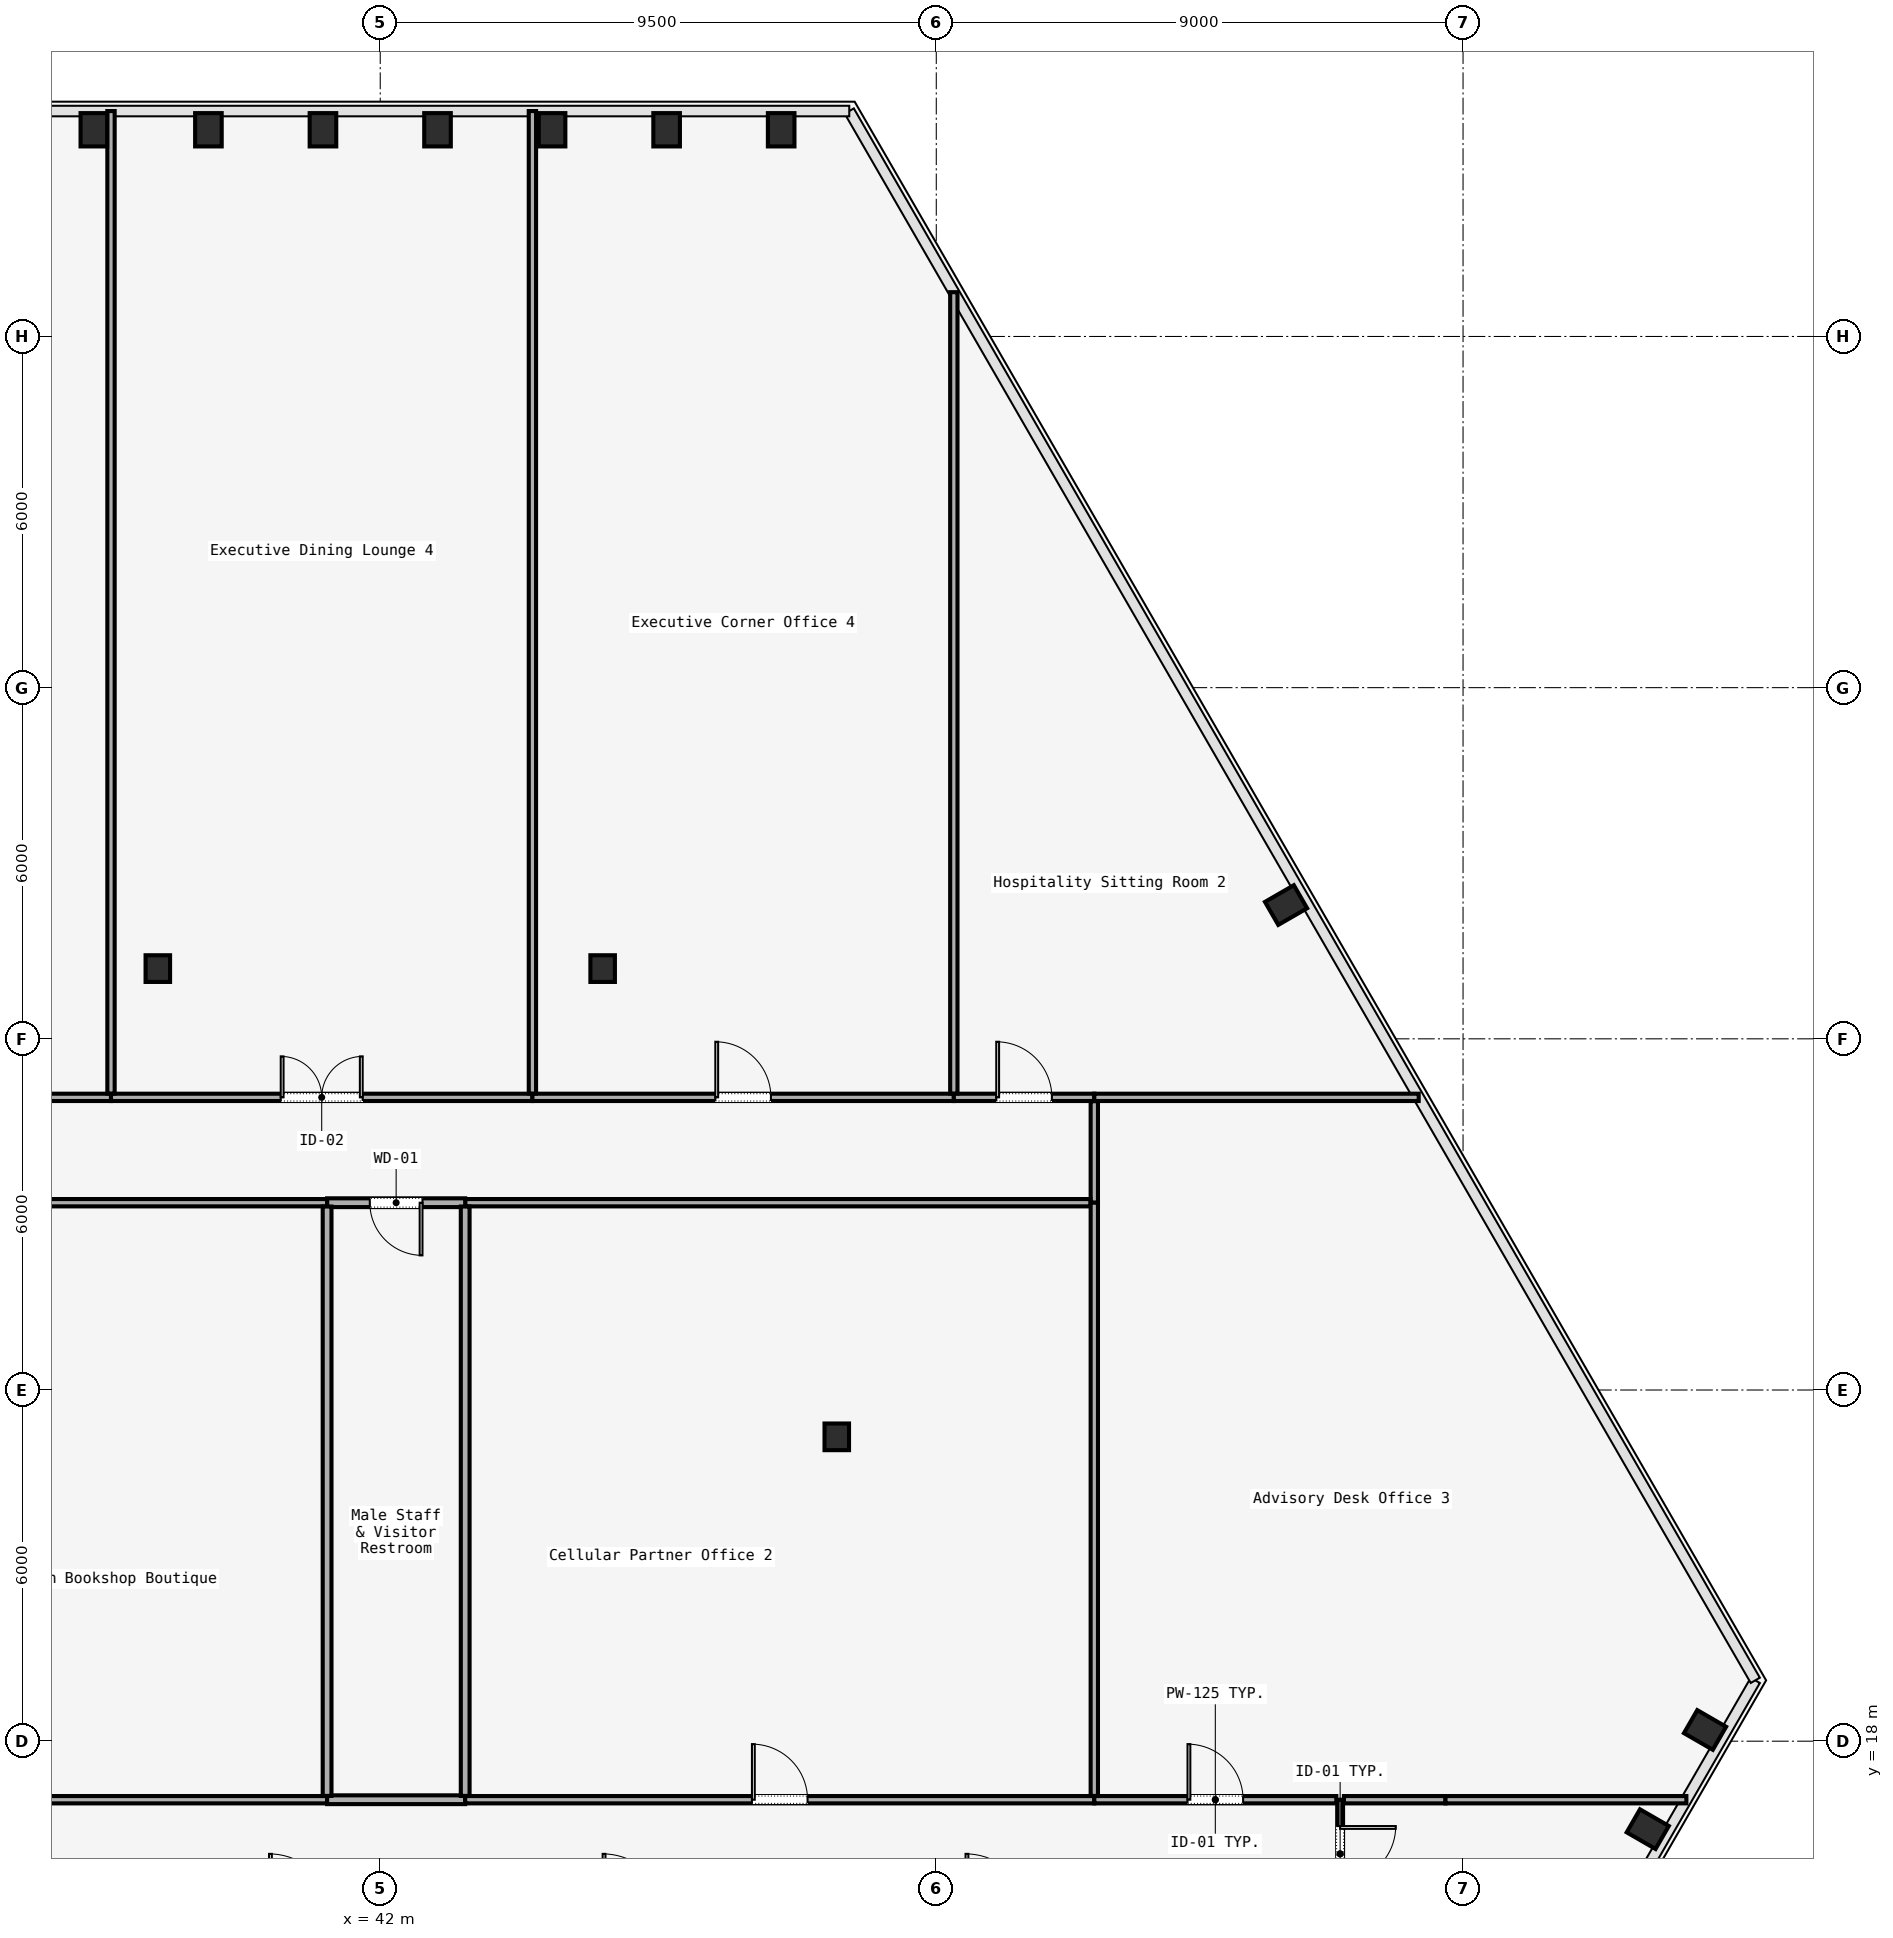
"""IFC4 building model, lengths in metres.
Left out: names, types, materials, properties, quantities, classifications, styles, units other than length and angle.
Written with IfcOpenShell. Run it as: python <this file> out.ifc"""

import sys

from ifc_helpers import new_model, si_unit, direction, frame, frame_2d, origin, origin_2d, place, context, subcontext, project, spatial, rectangle, i_section, extrude, element, fill, save


model = new_model("IFC4")
c1 = context("Model", 3, precision=1e-05, world=origin(), true_north=direction((0.0, 1.0)))
c2 = subcontext(c1, "Body", "Model", "MODEL_VIEW")
j1 = project(units=[si_unit("LENGTHUNIT", "METRE"), si_unit("PLANEANGLEUNIT", "RADIAN")], contexts=[c1])
p1 = place(None, origin())
s1 = spatial("IfcSite", under=j1, at=p1, CompositionType="ELEMENT")
p2 = place(p1, origin())
s2 = spatial("IfcBuilding", under=s1, at=p2, CompositionType="ELEMENT")
p3 = place(p2, frame((0.0, 0.0, 51.2)))
s3 = spatial("IfcBuildingStorey", under=s2, at=p3, CompositionType="ELEMENT", Elevation=51.2)
for number, where, z_axis, x_axis in (
    (1, (49.8, 23.2, 0.0), (0.0, 0.0, 1.0), (1.0, 0.0, 0.0)),
    (2, (38.2, 31.2, 0.0), (0.0, 0.0, 1.0), (1.0, 0.0, 0.0)),
    (3, (45.8, 31.2, 0.0), (0.0, 0.0, 1.0), (1.0, 0.0, 0.0)),
):
    element("IfcColumn", number, at=place(p3, frame(where, z_axis=z_axis, x_axis=x_axis)), inside=s3, PredefinedType="COLUMN", context=c2, shape_type="SweptSolid", body=[
        extrude(i_section(OverallWidth=0.418, OverallDepth=0.456, WebThickness=0.042, FlangeThickness=0.067, FilletRadius=0.015, at=origin_2d()), origin(), (0.0, 0.0, 1.0), 3.58),
    ])
for number, where, z_axis, x_axis in (
    (4, (63.656, 16.497, 0.0), (0.0, 0.0, 1.0), (0.5, 0.866, 0.0)),
    (5, (64.635, 18.192, 0.0), (0.0, 0.0, 1.0), (0.5, 0.866, 0.0)),
    (6, (57.476, 32.285, 0.0), (0.0, 0.0, 1.0), (-0.5, 0.866, 0.0)),
    (7, (48.85, 45.531, 0.0), (0.0, 0.0, 1.0), (1.0, 0.0, 0.0)),
    (8, (46.893, 45.531, 0.0), (0.0, 0.0, 1.0), (1.0, 0.0, 0.0)),
    (9, (44.936, 45.531, 0.0), (0.0, 0.0, 1.0), (1.0, 0.0, 0.0)),
    (10, (42.979, 45.531, 0.0), (0.0, 0.0, 1.0), (1.0, 0.0, 0.0)),
    (11, (41.021, 45.531, 0.0), (0.0, 0.0, 1.0), (1.0, 0.0, 0.0)),
    (12, (39.064, 45.531, 0.0), (0.0, 0.0, 1.0), (1.0, 0.0, 0.0)),
    (13, (37.107, 45.531, 0.0), (0.0, 0.0, 1.0), (1.0, 0.0, 0.0)),
):
    element("IfcColumn", number, at=place(p3, frame(where, z_axis=z_axis, x_axis=x_axis)), inside=s3, PredefinedType="COLUMN", context=c2, shape_type="SweptSolid", body=[
        extrude(i_section(OverallWidth=0.454, OverallDepth=0.569, WebThickness=0.078, FlangeThickness=0.08, FilletRadius=0.015, at=origin_2d()), origin(), (0.0, 0.0, 1.0), 3.58),
    ])
p4 = place(p3, frame((58.4, 17.0, 0.0), z_axis=(0.0, 0.0, 1.0), x_axis=(0.0, -1.0, 0.0)))
e14 = element("IfcWall", 14, at=p4, inside=s3, PredefinedType="MOVABLE", context=c2, shape_type="SweptSolid", body=[
    extrude(rectangle(XDim=1.85, YDim=0.1, at=frame_2d((0.925, 0.0))), origin(), (0.0, 0.0, 1.0), 2.933),
])
p5 = place(p4, frame((0.45, 0.0, 0.0)))
e15 = element("IfcOpeningElement", 15, at=p5, cuts=e14, PredefinedType="OPENING", context=c2, shape_type="SweptSolid", body=[
    extrude(rectangle(XDim=0.95, YDim=2.2, at=frame_2d((0.475, 1.1))), frame((0.0, 0.05, 0.0), z_axis=(0.0, -1.0, 0.0), x_axis=(1.0, 0.0, 0.0)), (0.0, 0.0, 1.0), 0.1),
])
p6 = place(p3, frame((31.6, 29.0, 0.0), z_axis=(0.0, 0.0, 1.0), x_axis=(1.0, 0.0, 0.0)))
e16 = element("IfcWall", 16, at=p6, inside=s3, PredefinedType="PARTITIONING", context=c2, shape_type="SweptSolid", body=[
    extrude(rectangle(XDim=5.8, YDim=0.125, at=frame_2d((2.9, 0.0))), origin(), (0.0, 0.0, 1.0), 2.933),
])
p7 = place(p6, frame((2.425, 0.0, 0.0)))
e17 = element("IfcOpeningElement", 17, at=p7, cuts=e16, PredefinedType="OPENING", context=c2, shape_type="SweptSolid", body=[
    extrude(rectangle(XDim=0.95, YDim=2.2, at=frame_2d((0.475, 1.1))), frame((0.0, 0.062, 0.0), z_axis=(0.0, -1.0, 0.0), x_axis=(1.0, 0.0, 0.0)), (0.0, 0.0, 1.0), 0.125),
])
p8 = place(p3, frame((37.4, 29.0, 0.0), z_axis=(0.0, 0.0, 1.0), x_axis=(1.0, 0.0, 0.0)))
e18 = element("IfcWall", 18, at=p8, inside=s3, PredefinedType="PARTITIONING", context=c2, shape_type="SweptSolid", body=[
    extrude(rectangle(XDim=7.2, YDim=0.125, at=frame_2d((3.6, 0.0))), origin(), (0.0, 0.0, 1.0), 2.933),
])
p9 = place(p8, frame((2.9, 0.0, 0.0)))
e19 = element("IfcOpeningElement", 19, at=p9, cuts=e18, PredefinedType="OPENING", context=c2, shape_type="SweptSolid", body=[
    extrude(rectangle(XDim=1.4, YDim=2.2, at=frame_2d((0.7, 1.1))), frame((0.0, 0.062, 0.0), z_axis=(0.0, -1.0, 0.0), x_axis=(1.0, 0.0, 0.0)), (0.0, 0.0, 1.0), 0.125),
])
p10 = place(p3, frame((44.6, 29.0, 0.0), z_axis=(0.0, 0.0, 1.0), x_axis=(1.0, 0.0, 0.0)))
e20 = element("IfcWall", 20, at=p10, inside=s3, PredefinedType="PARTITIONING", context=c2, shape_type="SweptSolid", body=[
    extrude(rectangle(XDim=7.2, YDim=0.125, at=frame_2d((3.6, 0.0))), origin(), (0.0, 0.0, 1.0), 2.933),
])
p11 = place(p10, frame((3.125, 0.0, 0.0)))
e21 = element("IfcOpeningElement", 21, at=p11, cuts=e20, PredefinedType="OPENING", context=c2, shape_type="SweptSolid", body=[
    extrude(rectangle(XDim=0.95, YDim=2.2, at=frame_2d((0.475, 1.1))), frame((0.0, 0.062, 0.0), z_axis=(0.0, -1.0, 0.0), x_axis=(1.0, 0.0, 0.0)), (0.0, 0.0, 1.0), 0.125),
])
p12 = place(p3, frame((51.8, 29.0, 0.0), z_axis=(0.0, 0.0, 1.0), x_axis=(1.0, 0.0, 0.0)))
e22 = element("IfcWall", 22, at=p12, inside=s3, PredefinedType="PARTITIONING", context=c2, shape_type="SweptSolid", body=[
    extrude(rectangle(XDim=2.4, YDim=0.125, at=frame_2d((1.2, 0.0))), origin(), (0.0, 0.0, 1.0), 2.933),
])
p13 = place(p12, frame((0.725, 0.0, 0.0)))
e23 = element("IfcOpeningElement", 23, at=p13, cuts=e22, PredefinedType="OPENING", context=c2, shape_type="SweptSolid", body=[
    extrude(rectangle(XDim=0.95, YDim=2.2, at=frame_2d((0.475, 1.1))), frame((0.0, 0.062, 0.0), z_axis=(0.0, -1.0, 0.0), x_axis=(1.0, 0.0, 0.0)), (0.0, 0.0, 1.0), 0.125),
])
p14 = place(p3, frame((54.2, 28.935, 0.0), z_axis=(0.0, 0.0, 1.0), x_axis=(0.0, -1.0, 0.0)))
e24 = element("IfcWall", 24, at=p14, inside=s3, PredefinedType="PARTITIONING", context=c2, shape_type="SweptSolid", body=[
    extrude(rectangle(XDim=1.735, YDim=0.125, at=frame_2d((0.868, 0.0))), origin(), (0.0, 0.0, 1.0), 2.933),
])
p15 = place(p3, frame((54.135, 27.2, 0.0), z_axis=(0.0, 0.0, 1.0), x_axis=(-1.0, 0.0, 0.0)))
e25 = element("IfcWall", 25, at=p15, inside=s3, PredefinedType="PARTITIONING", context=c2, shape_type="SweptSolid", body=[
    extrude(rectangle(XDim=10.684, YDim=0.125, at=frame_2d((5.342, 0.0))), origin(), (0.0, 0.0, 1.0), 2.933),
])
p16 = place(p3, frame((43.451, 27.2, 0.0), z_axis=(0.0, 0.0, 1.0), x_axis=(-1.0, 0.0, 0.0)))
e26 = element("IfcWall", 26, at=p16, inside=s3, PredefinedType="PARTITIONING", context=c2, shape_type="SweptSolid", body=[
    extrude(rectangle(XDim=2.359, YDim=0.15, at=frame_2d((1.18, 0.0))), origin(), (0.0, 0.0, 1.0), 2.933),
])
p17 = place(p16, frame((0.73, 0.0, 0.0)))
e27 = element("IfcOpeningElement", 27, at=p17, cuts=e26, PredefinedType="OPENING", context=c2, shape_type="SweptSolid", body=[
    extrude(rectangle(XDim=0.9, YDim=2.15, at=frame_2d((0.45, 1.075))), frame((0.0, 0.075, 0.0), z_axis=(0.0, -1.0, 0.0), x_axis=(1.0, 0.0, 0.0)), (0.0, 0.0, 1.0), 0.15),
])
p18 = place(p3, frame((41.092, 27.2, 0.0), z_axis=(0.0, 0.0, 1.0), x_axis=(-1.0, 0.0, 0.0)))
e28 = element("IfcWall", 28, at=p18, inside=s3, PredefinedType="PARTITIONING", context=c2, shape_type="SweptSolid", body=[
    extrude(rectangle(XDim=9.492, YDim=0.125, at=frame_2d((4.746, 0.0))), origin(), (0.0, 0.0, 1.0), 2.933),
])
p19 = place(p3, frame((31.665, 17.0, 0.0), z_axis=(0.0, 0.0, 1.0), x_axis=(1.0, 0.0, 0.0)))
e29 = element("IfcWall", 29, at=p19, inside=s3, PredefinedType="PARTITIONING", context=c2, shape_type="SweptSolid", body=[
    extrude(rectangle(XDim=9.427, YDim=0.125, at=frame_2d((4.713, 0.0))), origin(), (0.0, 0.0, 1.0), 2.933),
])
p20 = place(p3, frame((41.092, 17.0, 0.0), z_axis=(0.0, 0.0, 1.0), x_axis=(1.0, 0.0, 0.0)))
e30 = element("IfcWall", 30, at=p20, inside=s3, PredefinedType="PARTITIONING", context=c2, shape_type="SweptSolid", body=[
    extrude(rectangle(XDim=2.359, YDim=0.15, at=frame_2d((1.18, 0.0))), origin(), (0.0, 0.0, 1.0), 2.933),
])
p21 = place(p3, frame((43.451, 17.0, 0.0), z_axis=(0.0, 0.0, 1.0), x_axis=(1.0, 0.0, 0.0)))
e31 = element("IfcWall", 31, at=p21, inside=s3, PredefinedType="PARTITIONING", context=c2, shape_type="SweptSolid", body=[
    extrude(rectangle(XDim=10.749, YDim=0.125, at=frame_2d((5.374, 0.0))), origin(), (0.0, 0.0, 1.0), 2.933),
])
p22 = place(p21, frame((4.899, 0.0, 0.0)))
e32 = element("IfcOpeningElement", 32, at=p22, cuts=e31, PredefinedType="OPENING", context=c2, shape_type="SweptSolid", body=[
    extrude(rectangle(XDim=0.95, YDim=2.2, at=frame_2d((0.475, 1.1))), frame((0.0, 0.062, 0.0), z_axis=(0.0, -1.0, 0.0), x_axis=(1.0, 0.0, 0.0)), (0.0, 0.0, 1.0), 0.125),
])
p23 = place(p3, frame((54.2, 17.0, 0.0), z_axis=(0.0, 0.0, 1.0), x_axis=(1.0, 0.0, 0.0)))
e33 = element("IfcWall", 33, at=p23, inside=s3, PredefinedType="PARTITIONING", context=c2, shape_type="SweptSolid", body=[
    extrude(rectangle(XDim=4.135, YDim=0.125, at=frame_2d((2.067, 0.0))), origin(), (0.0, 0.0, 1.0), 2.933),
])
p24 = place(p23, frame((1.593, 0.0, 0.0)))
e34 = element("IfcOpeningElement", 34, at=p24, cuts=e33, PredefinedType="OPENING", context=c2, shape_type="SweptSolid", body=[
    extrude(rectangle(XDim=0.95, YDim=2.2, at=frame_2d((0.475, 1.1))), frame((0.0, 0.062, 0.0), z_axis=(0.0, -1.0, 0.0), x_axis=(1.0, 0.0, 0.0)), (0.0, 0.0, 1.0), 0.125),
])
p25 = place(p3, frame((58.465, 17.0, 0.0), z_axis=(0.0, 0.0, 1.0), x_axis=(1.0, 0.0, 0.0)))
e35 = element("IfcWall", 35, at=p25, inside=s3, PredefinedType="PARTITIONING", context=c2, shape_type="SweptSolid", body=[
    extrude(rectangle(XDim=1.735, YDim=0.125, at=frame_2d((0.867, 0.0))), origin(), (0.0, 0.0, 1.0), 2.933),
])
p26 = place(p3, frame((60.2, 17.0, 0.0), z_axis=(0.0, 0.0, 1.0), x_axis=(1.0, 0.0, 0.0)))
e36 = element("IfcWall", 36, at=p26, inside=s3, PredefinedType="PARTITIONING", context=c2, shape_type="SweptSolid", body=[
    extrude(rectangle(XDim=4.116, YDim=0.125, at=frame_2d((2.058, 0.0))), origin(), (0.0, 0.0, 1.0), 2.933),
])
for number, where, z_axis, x_axis in (
    (37, (41.092, 27.135, 0.0), (0.0, 0.0, 1.0), (0.0, -1.0, 0.0)),
    (38, (43.451, 27.135, 0.0), (0.0, 0.0, 1.0), (0.0, -1.0, 0.0)),
):
    element("IfcWall", number, at=place(p3, frame(where, z_axis=z_axis, x_axis=x_axis)), inside=s3, PredefinedType="PARTITIONING", context=c2, shape_type="SweptSolid", body=[
        extrude(rectangle(XDim=10.07, YDim=0.15, at=frame_2d((5.035, 0.0))), origin(), (0.0, 0.0, 1.0), 2.933),
    ])
p27 = place(p3, frame((54.2, 27.2, 0.0), z_axis=(0.0, 0.0, 1.0), x_axis=(0.0, -1.0, 0.0)))
e39 = element("IfcWall", 39, at=p27, inside=s3, PredefinedType="PARTITIONING", context=c2, shape_type="SweptSolid", body=[
    extrude(rectangle(XDim=10.135, YDim=0.125, at=frame_2d((5.067, 0.0))), origin(), (0.0, 0.0, 1.0), 2.933),
])
p28 = place(p3, frame((54.2, 29.0, 0.0), z_axis=(0.0, 0.0, 1.0), x_axis=(1.0, 0.0, 0.0)))
e40 = element("IfcWall", 40, at=p28, inside=s3, PredefinedType="PARTITIONING", context=c2, shape_type="SweptSolid", body=[
    extrude(rectangle(XDim=5.542, YDim=0.125, at=frame_2d((2.771, 0.0))), origin(), (0.0, 0.0, 1.0), 2.933),
])
p29 = place(p3, frame((51.8, 29.065, 0.0), z_axis=(0.0, 0.0, 1.0), x_axis=(0.0, 1.0, 0.0)))
e41 = element("IfcWall", 41, at=p29, inside=s3, PredefinedType="PARTITIONING", context=c2, shape_type="SweptSolid", body=[
    extrude(rectangle(XDim=13.692, YDim=0.125, at=frame_2d((6.846, 0.0))), origin(), (0.0, 0.0, 1.0), 2.933),
])
for number, where, z_axis, x_axis in (
    (42, (37.4, 45.851, 0.0), (0.0, 0.0, 1.0), (0.0, -1.0, 0.0)),
    (43, (44.6, 29.065, 0.0), (0.0, 0.0, 1.0), (0.0, 1.0, 0.0)),
):
    element("IfcWall", number, at=place(p3, frame(where, z_axis=z_axis, x_axis=x_axis)), inside=s3, PredefinedType="PARTITIONING", context=c2, shape_type="SweptSolid", body=[
        extrude(rectangle(XDim=16.786, YDim=0.125, at=frame_2d((8.393, 0.0))), origin(), (0.0, 0.0, 1.0), 2.933),
    ])
p30 = place(p5, origin())
e44 = element("IfcDoor", 44, at=p30, inside=s3, OperationType="SINGLE_SWING_RIGHT", PredefinedType="DOOR", context=c2, shape_type="SweptSolid", body=[
    extrude(rectangle(XDim=0.95, YDim=2.2, at=frame_2d((0.475, 1.1))), frame((0.0, 0.025, 0.0), z_axis=(0.0, -1.0, 0.0), x_axis=(1.0, 0.0, 0.0)), (0.0, 0.0, 1.0), 0.05),
])
fill(e15, e44)
p31 = place(p17, origin())
e45 = element("IfcDoor", 45, at=p31, inside=s3, OperationType="SINGLE_SWING_LEFT", PredefinedType="DOOR", context=c2, shape_type="SweptSolid", body=[
    extrude(rectangle(XDim=0.9, YDim=2.15, at=frame_2d((0.45, 1.075))), frame((0.0, 0.025, 0.0), z_axis=(0.0, -1.0, 0.0), x_axis=(1.0, 0.0, 0.0)), (0.0, 0.0, 1.0), 0.05),
])
fill(e27, e45)
p32 = place(p22, origin())
e46 = element("IfcDoor", 46, at=p32, inside=s3, OperationType="SINGLE_SWING_RIGHT", PredefinedType="DOOR", context=c2, shape_type="SweptSolid", body=[
    extrude(rectangle(XDim=0.95, YDim=2.2, at=frame_2d((0.475, 1.1))), frame((0.0, 0.025, 0.0), z_axis=(0.0, -1.0, 0.0), x_axis=(1.0, 0.0, 0.0)), (0.0, 0.0, 1.0), 0.05),
])
fill(e32, e46)
p33 = place(p24, origin())
e47 = element("IfcDoor", 47, at=p33, inside=s3, OperationType="SINGLE_SWING_LEFT", PredefinedType="DOOR", context=c2, shape_type="SweptSolid", body=[
    extrude(rectangle(XDim=0.95, YDim=2.2, at=frame_2d((0.475, 1.1))), frame((0.0, 0.025, 0.0), z_axis=(0.0, -1.0, 0.0), x_axis=(1.0, 0.0, 0.0)), (0.0, 0.0, 1.0), 0.05),
])
fill(e34, e47)
p34 = place(p13, origin())
e48 = element("IfcDoor", 48, at=p34, inside=s3, OperationType="SINGLE_SWING_LEFT", PredefinedType="DOOR", context=c2, shape_type="SweptSolid", body=[
    extrude(rectangle(XDim=0.95, YDim=2.2, at=frame_2d((0.475, 1.1))), frame((0.0, 0.025, 0.0), z_axis=(0.0, -1.0, 0.0), x_axis=(1.0, 0.0, 0.0)), (0.0, 0.0, 1.0), 0.05),
])
fill(e23, e48)
p35 = place(p11, origin())
e49 = element("IfcDoor", 49, at=p35, inside=s3, OperationType="SINGLE_SWING_LEFT", PredefinedType="DOOR", context=c2, shape_type="SweptSolid", body=[
    extrude(rectangle(XDim=0.95, YDim=2.2, at=frame_2d((0.475, 1.1))), frame((0.0, 0.025, 0.0), z_axis=(0.0, -1.0, 0.0), x_axis=(1.0, 0.0, 0.0)), (0.0, 0.0, 1.0), 0.05),
])
fill(e21, e49)
p36 = place(p9, origin())
e50 = element("IfcDoor", 50, at=p36, inside=s3, OperationType="SINGLE_SWING_RIGHT", PredefinedType="DOOR", context=c2, shape_type="SweptSolid", body=[
    extrude(rectangle(XDim=1.4, YDim=2.2, at=frame_2d((0.7, 1.1))), frame((0.0, 0.025, 0.0), z_axis=(0.0, -1.0, 0.0), x_axis=(1.0, 0.0, 0.0)), (0.0, 0.0, 1.0), 0.05),
])
fill(e19, e50)
save(model, sys.argv[1])
